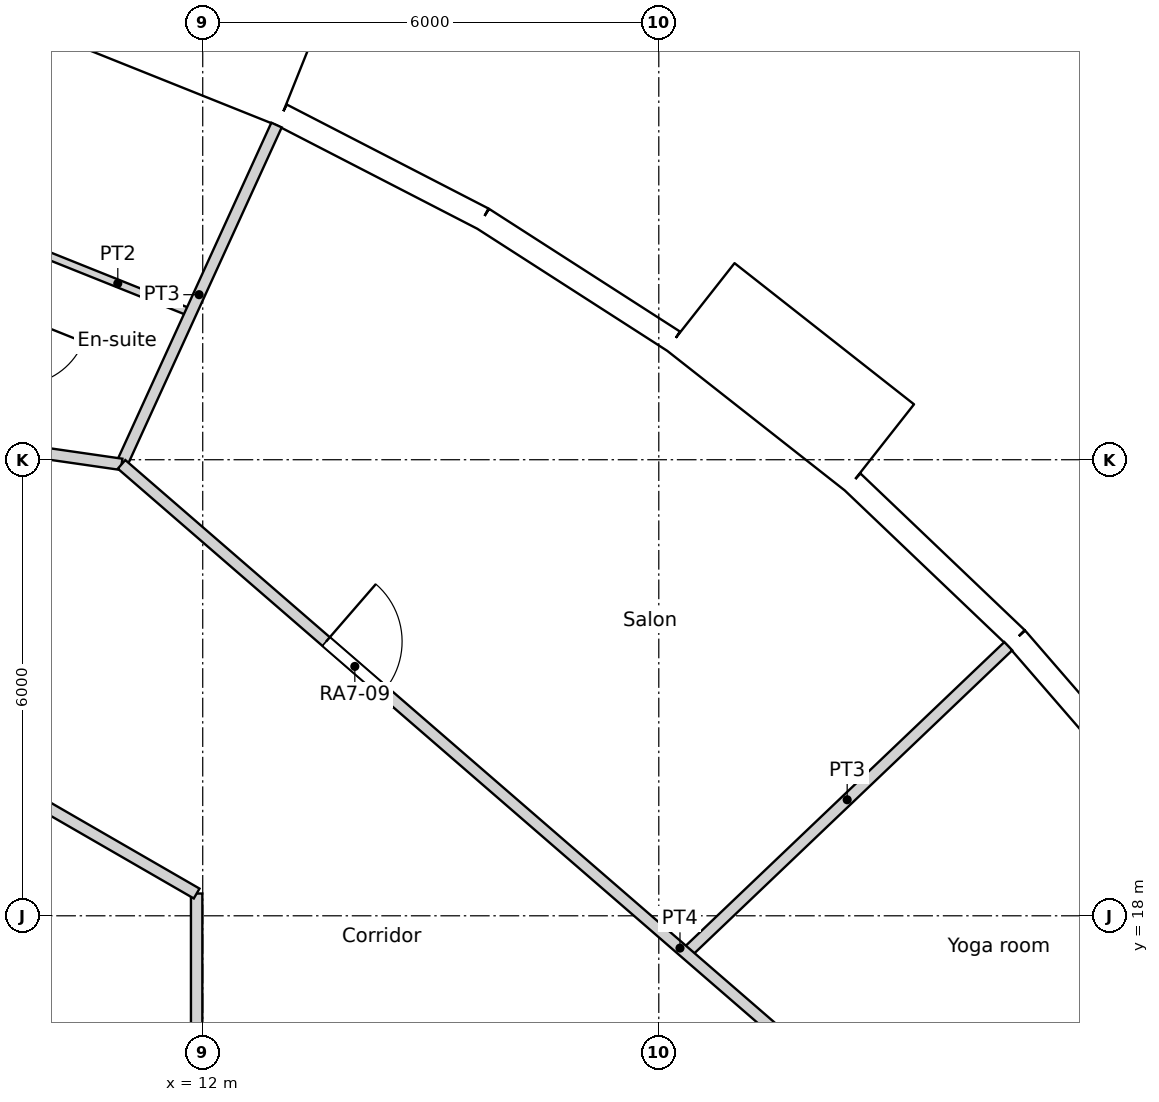
"""IFC4 building model, lengths in metres.
Left out: names, types, materials, properties, quantities, classifications, styles, units other than length and angle.
Written with IfcOpenShell. Run it as: python <this file> out.ifc"""

import sys

from ifc_helpers import new_model, si_unit, direction, frame, frame_2d, origin, origin_2d, place, context, subcontext, project, spatial, rectangle, circle, extrude, element, fill, save


model = new_model("IFC4")
c1 = context("Model", 3, precision=1e-05, world=origin(), true_north=direction((0.0, 1.0)))
c2 = subcontext(c1, "Body", "Model", "MODEL_VIEW")
j1 = project(units=[si_unit("LENGTHUNIT", "METRE"), si_unit("PLANEANGLEUNIT", "RADIAN")], contexts=[c1])
p1 = place(None, origin())
s1 = spatial("IfcSite", under=j1, at=p1, CompositionType="ELEMENT")
p2 = place(p1, origin())
s2 = spatial("IfcBuilding", under=s1, at=p2, CompositionType="ELEMENT")
p3 = place(p2, frame((0.0, 0.0, 93.0)))
s3 = spatial("IfcBuildingStorey", under=s2, at=p3, CompositionType="ELEMENT", Elevation=93.0)
for number, where, z_axis, x_axis in (
    (1, (21.911, 20.892, 0.0), (0.0, 0.0, 1.0), (1.0, 0.0, 0.0)),
    (2, (17.561, 24.661, 0.0), (0.0, 0.0, 1.0), (1.0, 0.0, 0.0)),
    (3, (12.576, 27.539, 0.0), (0.0, 0.0, 1.0), (1.0, 0.0, 0.0)),
):
    element("IfcColumn", number, at=place(p3, frame(where, z_axis=z_axis, x_axis=x_axis)), inside=s3, PredefinedType="COLUMN", context=c2, shape_type="SweptSolid", body=[
        extrude(circle(Radius=0.6, at=origin_2d()), origin(), (0.0, 0.0, 1.0), 3.6),
    ])
for number, where, z_axis, x_axis in (
    (4, (14.659, 19.69, 0.0), (0.0, 0.0, 1.0), (1.0, 0.0, 0.0)),
    (5, (9.723, 22.54, 0.0), (0.0, 0.0, 1.0), (1.0, 0.0, 0.0)),
):
    element("IfcColumn", number, at=place(p3, frame(where, z_axis=z_axis, x_axis=x_axis)), inside=s3, PredefinedType="COLUMN", context=c2, shape_type="SweptSolid", body=[
        extrude(circle(Radius=0.65, at=origin_2d()), origin(), (0.0, 0.0, 1.0), 3.6),
    ])
p4 = place(p3, frame((24.658, 19.399, 0.0), z_axis=(0.0, 0.0, 1.0), x_axis=(-0.654830712471, 0.755775587066, 0.0)))
e6 = element("IfcWall", 6, at=p4, inside=s3, PredefinedType="SOLIDWALL", context=c2, shape_type="SweptSolid", body=[
    extrude(rectangle(XDim=2.98, YDim=0.3, at=frame_2d((1.49, 0.0))), origin(), (0.0, 0.0, 1.0), 3.15),
])
p5 = place(p4, frame((1.49, 0.0, 1.55)))
e7 = element("IfcOpeningElement", 7, at=p5, cuts=e6, PredefinedType="OPENING", context=c2, shape_type="SweptSolid", body=[
    extrude(circle(Radius=0.9, at=origin_2d()), frame((0.0, 0.16, 0.0), z_axis=(0.0, -1.0, 0.0), x_axis=(1.0, 0.0, 0.0)), (0.0, 0.0, 1.0), 0.32),
])
p6 = place(p3, frame((22.707, 21.651, 0.0), z_axis=(0.0, 0.0, 1.0), x_axis=(-0.723744206617, 0.690068346896, 0.0)))
e8 = element("IfcWall", 8, at=p6, inside=s3, PredefinedType="SOLIDWALL", context=c2, shape_type="SweptSolid", body=[
    extrude(rectangle(XDim=2.98, YDim=0.3, at=frame_2d((1.49, 0.0))), origin(), (0.0, 0.0, 1.0), 3.15),
])
p7 = place(p6, frame((1.49, 0.0, 1.55)))
e9 = element("IfcOpeningElement", 9, at=p7, cuts=e8, PredefinedType="OPENING", context=c2, shape_type="SweptSolid", body=[
    extrude(circle(Radius=0.9, at=origin_2d()), frame((0.0, 0.16, 0.0), z_axis=(0.0, -1.0, 0.0), x_axis=(1.0, 0.0, 0.0)), (0.0, 0.0, 1.0), 0.32),
])
p8 = place(p3, frame((20.907, 24.159, -0.45), z_axis=(0.0, 0.0, 1.0), x_axis=(-0.786049992888, 0.618162930529, 0.0)))
e10 = element("IfcWall", 10, at=p8, inside=s3, PredefinedType="ELEMENTEDWALL", context=c2, shape_type="SweptSolid", body=[
    extrude(rectangle(XDim=3.0, YDim=1.45, at=frame_2d((1.5, 0.0))), origin(), (0.0, 0.0, 1.0), 3.6),
])
p9 = place(p8, frame((1.5, 0.0, 2.0)))
e11 = element("IfcOpeningElement", 11, at=p9, cuts=e10, PredefinedType="OPENING", context=c2, shape_type="SweptSolid", body=[
    extrude(circle(Radius=0.9, at=origin_2d()), frame((0.0, 0.735, 0.0), z_axis=(0.0, -1.0, 0.0), x_axis=(1.0, 0.0, 0.0)), (0.0, 0.0, 1.0), 1.47),
])
p10 = place(p3, frame((18.194, 25.56, 0.0), z_axis=(0.0, 0.0, 1.0), x_axis=(-0.84122372879, 0.540687190639, 0.0)))
e12 = element("IfcWall", 12, at=p10, inside=s3, PredefinedType="SOLIDWALL", context=c2, shape_type="SweptSolid", body=[
    extrude(rectangle(XDim=2.98, YDim=0.3, at=frame_2d((1.49, 0.0))), origin(), (0.0, 0.0, 1.0), 3.15),
])
p11 = place(p10, frame((1.49, 0.0, 1.55)))
e13 = element("IfcOpeningElement", 13, at=p11, cuts=e12, PredefinedType="OPENING", context=c2, shape_type="SweptSolid", body=[
    extrude(circle(Radius=0.9, at=origin_2d()), frame((0.0, 0.16, 0.0), z_axis=(0.0, -1.0, 0.0), x_axis=(1.0, 0.0, 0.0)), (0.0, 0.0, 1.0), 0.32),
])
p12 = place(p3, frame((15.687, 27.171, 0.0), z_axis=(0.0, 0.0, 1.0), x_axis=(-0.888853225096, 0.4581920386, 0.0)))
e14 = element("IfcWall", 14, at=p12, inside=s3, PredefinedType="SOLIDWALL", context=c2, shape_type="SweptSolid", body=[
    extrude(rectangle(XDim=2.979, YDim=0.3, at=frame_2d((1.49, 0.0))), origin(), (0.0, 0.0, 1.0), 3.15),
])
p13 = place(p12, frame((1.49, 0.0, 1.55)))
e15 = element("IfcOpeningElement", 15, at=p13, cuts=e14, PredefinedType="OPENING", context=c2, shape_type="SweptSolid", body=[
    extrude(circle(Radius=0.9, at=origin_2d()), frame((0.0, 0.16, 0.0), z_axis=(0.0, -1.0, 0.0), x_axis=(1.0, 0.0, 0.0)), (0.0, 0.0, 1.0), 0.32),
])
p14 = place(p3, frame((13.254, 29.07, -0.45), z_axis=(0.0, 0.0, 1.0), x_axis=(-0.928358776184, 0.371685327504, 0.0)))
e16 = element("IfcWall", 16, at=p14, inside=s3, PredefinedType="ELEMENTEDWALL", context=c2, shape_type="SweptSolid", body=[
    extrude(rectangle(XDim=3.0, YDim=1.45, at=frame_2d((1.5, 0.0))), origin(), (0.0, 0.0, 1.0), 3.6),
])
p15 = place(p14, frame((1.5, 0.0, 2.0)))
e17 = element("IfcOpeningElement", 17, at=p15, cuts=e16, PredefinedType="OPENING", context=c2, shape_type="SweptSolid", body=[
    extrude(circle(Radius=0.9, at=origin_2d()), frame((0.0, 0.735, 0.0), z_axis=(0.0, -1.0, 0.0), x_axis=(1.0, 0.0, 0.0)), (0.0, 0.0, 1.0), 1.47),
])
p16 = place(p3, frame((10.932, 23.939, 0.0), z_axis=(0.0, 0.0, 1.0), x_axis=(0.755823777664, -0.654775088956, 0.0)))
e18 = element("IfcWall", 18, at=p16, inside=s3, PredefinedType="PARTITIONING", context=c2, shape_type="SweptSolid", body=[
    extrude(rectangle(XDim=14.83, YDim=0.15, at=frame_2d((7.415, 0.0))), origin(), (0.0, 0.0, 1.0), 3.15),
])
p17 = place(p16, frame((3.56, 0.0, 0.0)))
e19 = element("IfcOpeningElement", 19, at=p17, cuts=e18, PredefinedType="OPENING", context=c2, shape_type="SweptSolid", body=[
    extrude(rectangle(XDim=1.0, YDim=2.04, at=frame_2d((0.5, 1.02))), frame((0.0, 0.075, 0.0), z_axis=(0.0, -1.0, 0.0), x_axis=(1.0, 0.0, 0.0)), (0.0, 0.0, 1.0), 0.15),
])
p18 = place(p3, frame((11.92, 11.92, 0.0), z_axis=(0.0, 0.0, 1.0), x_axis=(0.0, 1.0, 0.0)))
e20 = element("IfcWall", 20, at=p18, inside=s3, PredefinedType="PARTITIONING", context=c2, shape_type="SweptSolid", body=[
    extrude(rectangle(XDim=6.373, YDim=0.15, at=frame_2d((3.187, 0.0))), origin(), (0.0, 0.0, 1.0), 3.15),
])
p19 = place(p3, frame((5.842, 21.802, 0.0), z_axis=(0.0, 0.0, 1.0), x_axis=(0.866027436592, -0.499996479058, 0.0)))
e21 = element("IfcWall", 21, at=p19, inside=s3, PredefinedType="PARTITIONING", context=c2, shape_type="SweptSolid", body=[
    extrude(rectangle(XDim=7.018, YDim=0.15, at=frame_2d((3.509, 0.0))), origin(), (0.0, 0.0, 1.0), 3.15),
])
p20 = place(p3, frame((-3.746, 26.054, 0.0), z_axis=(0.0, 0.0, 1.0), x_axis=(0.989780545379, -0.142598990138, 0.0)))
e22 = element("IfcWall", 22, at=p20, inside=s3, PredefinedType="PARTITIONING", context=c2, shape_type="SweptSolid", body=[
    extrude(rectangle(XDim=14.83, YDim=0.15, at=frame_2d((7.415, 0.0))), origin(), (0.0, 0.0, 1.0), 3.15),
])
p21 = place(p20, frame((10.817, 0.0, 0.0)))
e23 = element("IfcOpeningElement", 23, at=p21, cuts=e22, PredefinedType="OPENING", context=c2, shape_type="SweptSolid", body=[
    extrude(rectangle(XDim=1.0, YDim=2.1, at=frame_2d((0.5, 1.05))), frame((0.0, 0.075, 0.0), z_axis=(0.0, -1.0, 0.0), x_axis=(1.0, 0.0, 0.0)), (0.0, 0.0, 1.0), 0.15),
])
p22 = place(p20, frame((5.954, 0.0, 0.0)))
e24 = element("IfcOpeningElement", 24, at=p22, cuts=e22, PredefinedType="OPENING", context=c2, shape_type="SweptSolid", body=[
    extrude(rectangle(XDim=1.0, YDim=2.1, at=frame_2d((0.5, 1.05))), frame((0.0, 0.075, 0.0), z_axis=(0.0, -1.0, 0.0), x_axis=(1.0, 0.0, 0.0)), (0.0, 0.0, 1.0), 0.15),
])
p23 = place(p20, frame((3.214, 0.0, 0.0)))
e25 = element("IfcOpeningElement", 25, at=p23, cuts=e22, PredefinedType="OPENING", context=c2, shape_type="SweptSolid", body=[
    extrude(rectangle(XDim=1.0, YDim=2.1, at=frame_2d((0.5, 1.05))), frame((0.0, 0.075, 0.0), z_axis=(0.0, -1.0, 0.0), x_axis=(1.0, 0.0, 0.0)), (0.0, 0.0, 1.0), 0.15),
])
p24 = place(p3, frame((18.359, 17.506, 0.0), z_axis=(0.0, 0.0, 1.0), x_axis=(0.723808715798, 0.690000683286, 0.0)))
e26 = element("IfcWall", 26, at=p24, inside=s3, PredefinedType="PARTITIONING", context=c2, shape_type="SweptSolid", body=[
    extrude(rectangle(XDim=5.856, YDim=0.15, at=frame_2d((2.928, 0.0))), origin(), (0.0, 0.0, 1.0), 3.15),
])
p25 = place(p3, frame((10.933, 23.94, 0.0), z_axis=(0.0, 0.0, 1.0), x_axis=(0.415286978667, 0.909690455787, 0.0)))
e27 = element("IfcWall", 27, at=p25, inside=s3, PredefinedType="PARTITIONING", context=c2, shape_type="SweptSolid", body=[
    extrude(rectangle(XDim=4.906, YDim=0.15, at=frame_2d((2.453, 0.0))), origin(), (0.0, 0.0, 1.0), 3.15),
])
p26 = place(p3, frame((9.921, 26.704, 0.0), z_axis=(0.0, 0.0, 1.0), x_axis=(0.928346586681, -0.37171577179, 0.0)))
e28 = element("IfcWall", 28, at=p26, inside=s3, PredefinedType="PARTITIONING", context=c2, shape_type="SweptSolid", body=[
    extrude(rectangle(XDim=2.072, YDim=0.1, at=frame_2d((1.036, 0.0))), origin(), (0.0, 0.0, 1.0), 3.15),
])
p27 = place(p5, origin())
e29 = element("IfcWindow", 29, at=p27, inside=s3, PartitioningType="SINGLE_PANEL", PredefinedType="WINDOW", context=c2, shape_type="SweptSolid", body=[
    extrude(circle(Radius=0.9, at=origin_2d()), frame((0.0, 0.12, 0.0), z_axis=(0.0, -1.0, 0.0), x_axis=(1.0, 0.0, 0.0)), (0.0, 0.0, 1.0), 0.1),
])
fill(e7, e29)
p28 = place(p7, origin())
e30 = element("IfcWindow", 30, at=p28, inside=s3, PartitioningType="SINGLE_PANEL", PredefinedType="WINDOW", context=c2, shape_type="SweptSolid", body=[
    extrude(circle(Radius=0.9, at=origin_2d()), frame((0.0, 0.12, 0.0), z_axis=(0.0, -1.0, 0.0), x_axis=(1.0, 0.0, 0.0)), (0.0, 0.0, 1.0), 0.1),
])
fill(e9, e30)
p29 = place(p9, origin())
e31 = element("IfcWindow", 31, at=p29, inside=s3, PartitioningType="SINGLE_PANEL", PredefinedType="WINDOW", context=c2, shape_type="SweptSolid", body=[
    extrude(circle(Radius=0.9, at=origin_2d()), frame((0.0, 0.695, 0.0), z_axis=(0.0, -1.0, 0.0), x_axis=(1.0, 0.0, 0.0)), (0.0, 0.0, 1.0), 0.1),
])
fill(e11, e31)
p30 = place(p11, origin())
e32 = element("IfcWindow", 32, at=p30, inside=s3, PartitioningType="SINGLE_PANEL", PredefinedType="WINDOW", context=c2, shape_type="SweptSolid", body=[
    extrude(circle(Radius=0.9, at=origin_2d()), frame((0.0, 0.12, 0.0), z_axis=(0.0, -1.0, 0.0), x_axis=(1.0, 0.0, 0.0)), (0.0, 0.0, 1.0), 0.1),
])
fill(e13, e32)
p31 = place(p13, origin())
e33 = element("IfcWindow", 33, at=p31, inside=s3, PartitioningType="SINGLE_PANEL", PredefinedType="WINDOW", context=c2, shape_type="SweptSolid", body=[
    extrude(circle(Radius=0.9, at=origin_2d()), frame((0.0, 0.12, 0.0), z_axis=(0.0, -1.0, 0.0), x_axis=(1.0, 0.0, 0.0)), (0.0, 0.0, 1.0), 0.1),
])
fill(e15, e33)
p32 = place(p15, origin())
e34 = element("IfcWindow", 34, at=p32, inside=s3, PartitioningType="SINGLE_PANEL", PredefinedType="WINDOW", context=c2, shape_type="SweptSolid", body=[
    extrude(circle(Radius=0.9, at=origin_2d()), frame((0.0, 0.695, 0.0), z_axis=(0.0, -1.0, 0.0), x_axis=(1.0, 0.0, 0.0)), (0.0, 0.0, 1.0), 0.1),
])
fill(e17, e34)
p33 = place(p17, origin())
e35 = element("IfcDoor", 35, at=p33, inside=s3, OperationType="SINGLE_SWING_LEFT", PredefinedType="DOOR", context=c2, shape_type="SweptSolid", body=[
    extrude(rectangle(XDim=1.0, YDim=2.04, at=frame_2d((0.5, 1.02))), frame((0.0, 0.025, 0.0), z_axis=(0.0, -1.0, 0.0), x_axis=(1.0, 0.0, 0.0)), (0.0, 0.0, 1.0), 0.05),
])
fill(e19, e35)
save(model, sys.argv[1])
